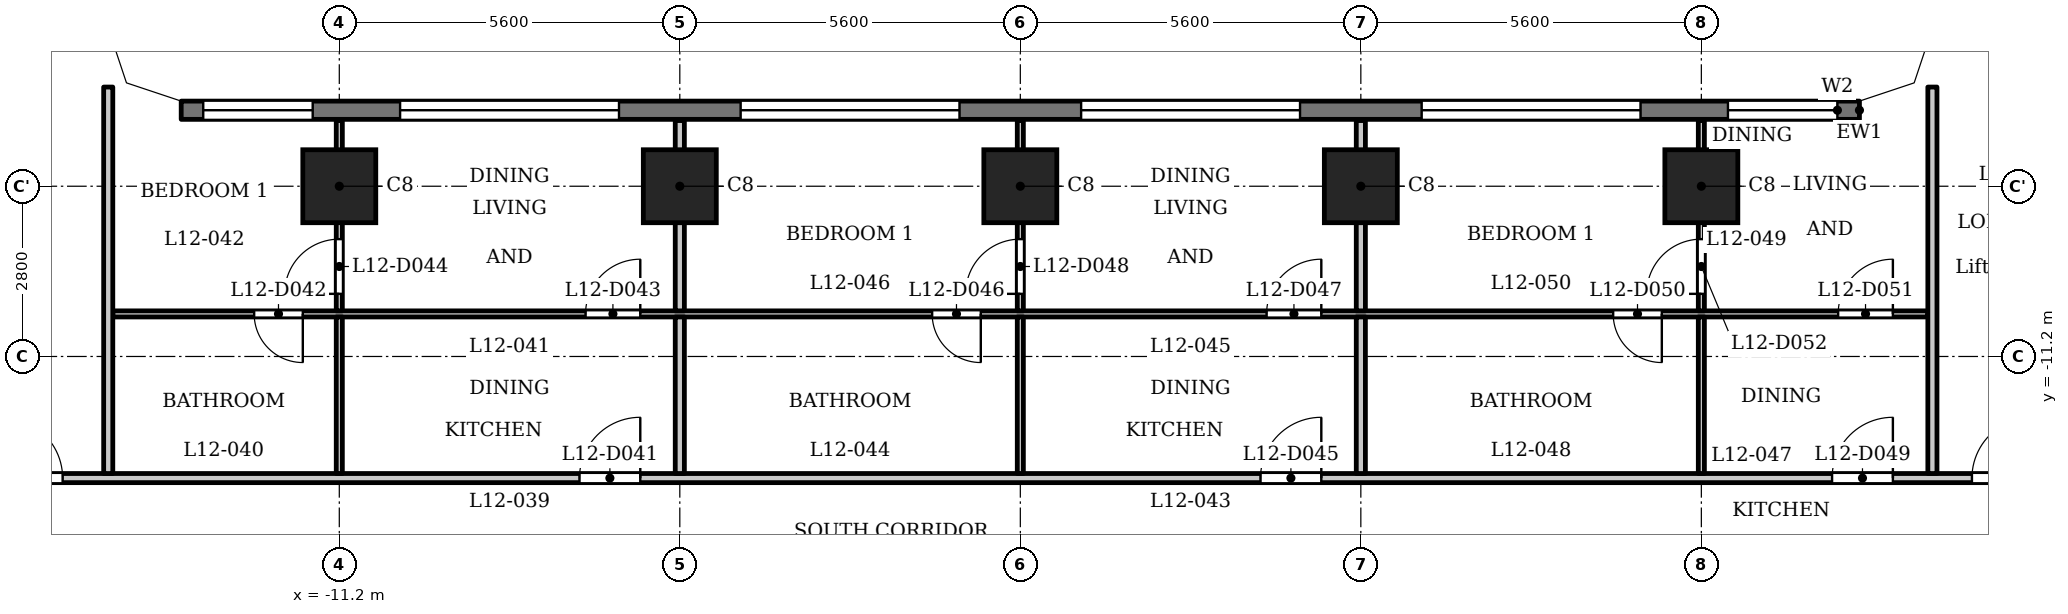
"""IFC4 building model, lengths in metres.
Left out: names, types, materials, properties, quantities, classifications, styles, units other than length and angle.
Written with IfcOpenShell. Run it as: python <this file> out.ifc"""

import sys

from ifc_helpers import new_model, si_unit, direction, frame, frame_2d, origin, origin_2d, place, context, subcontext, project, spatial, polyline, rectangle, outline, extrude, element, fill, save


model = new_model("IFC4")
c1 = context("Model", 3, precision=1e-05, world=origin(), true_north=direction((0.0, 1.0)))
c2 = subcontext(c1, "Body", "Model", "MODEL_VIEW")
j1 = project(units=[si_unit("LENGTHUNIT", "METRE"), si_unit("PLANEANGLEUNIT", "RADIAN")], contexts=[c1])
p1 = place(None, origin())
s1 = spatial("IfcSite", under=j1, at=p1, CompositionType="ELEMENT")
p2 = place(p1, origin())
s2 = spatial("IfcBuilding", under=s1, at=p2, CompositionType="ELEMENT")
p3 = place(p2, frame((0.0, 0.0, 51.5)))
s3 = spatial("IfcBuildingStorey", under=s2, at=p3, CompositionType="ELEMENT", Elevation=51.5)
for number, where, z_axis, x_axis in (
    (1, (-11.2, -8.4, 0.0), (0.0, 0.0, 1.0), (1.0, 0.0, 0.0)),
    (2, (-5.6, -8.4, 0.0), (0.0, 0.0, 1.0), (1.0, 0.0, 0.0)),
    (3, (0.0, -8.4, 0.0), (0.0, 0.0, 1.0), (1.0, 0.0, 0.0)),
    (4, (5.6, -8.4, 0.0), (0.0, 0.0, 1.0), (1.0, 0.0, 0.0)),
    (5, (11.2, -8.4, 0.0), (0.0, 0.0, 1.0), (1.0, 0.0, 0.0)),
):
    element("IfcColumn", number, at=place(p3, frame(where, z_axis=z_axis, x_axis=x_axis)), inside=s3, PredefinedType="COLUMN", context=c2, shape_type="SweptSolid", body=[
        extrude(rectangle(XDim=1.2, YDim=1.2, at=origin_2d()), origin(), (0.0, 0.0, 1.0), 3.5),
    ])
p4 = place(p3, frame((13.8, -7.15, 0.0), z_axis=(0.0, 0.0, 1.0), x_axis=(-1.0, 0.0, 0.0)))
e6 = element("IfcWall", 6, at=p4, inside=s3, PredefinedType="SOLIDWALL", context=c2, shape_type="SweptSolid", body=[
    extrude(rectangle(XDim=27.6, YDim=0.3, at=frame_2d((13.8, 0.0))), origin(), (0.0, 0.0, 1.0), 3.2),
])
p5 = place(p4, frame((0.363, 0.0, 0.9)))
e7 = element("IfcOpeningElement", 7, at=p5, cuts=e6, PredefinedType="OPENING", context=c2, shape_type="SweptSolid", body=[
    extrude(rectangle(XDim=1.8, YDim=1.25, at=frame_2d((0.9, 0.625))), frame((0.0, 0.16, 0.0), z_axis=(0.0, -1.0, 0.0), x_axis=(1.0, 0.0, 0.0)), (0.0, 0.0, 1.0), 0.32),
])
p6 = place(p4, frame((3.6, 0.0, 1.2)))
e8 = element("IfcOpeningElement", 8, at=p6, cuts=e6, PredefinedType="OPENING", context=c2, shape_type="SweptSolid", body=[
    extrude(rectangle(XDim=3.6, YDim=0.95, at=frame_2d((1.8, 0.475))), frame((0.0, 0.16, 0.0), z_axis=(0.0, -1.0, 0.0), x_axis=(1.0, 0.0, 0.0)), (0.0, 0.0, 1.0), 0.32),
])
p7 = place(p4, frame((9.2, 0.0, 1.2)))
e9 = element("IfcOpeningElement", 9, at=p7, cuts=e6, PredefinedType="OPENING", context=c2, shape_type="SweptSolid", body=[
    extrude(rectangle(XDim=3.6, YDim=0.95, at=frame_2d((1.8, 0.475))), frame((0.0, 0.16, 0.0), z_axis=(0.0, -1.0, 0.0), x_axis=(1.0, 0.0, 0.0)), (0.0, 0.0, 1.0), 0.32),
])
p8 = place(p4, frame((14.8, 0.0, 1.2)))
e10 = element("IfcOpeningElement", 10, at=p8, cuts=e6, PredefinedType="OPENING", context=c2, shape_type="SweptSolid", body=[
    extrude(rectangle(XDim=3.6, YDim=0.95, at=frame_2d((1.8, 0.475))), frame((0.0, 0.16, 0.0), z_axis=(0.0, -1.0, 0.0), x_axis=(1.0, 0.0, 0.0)), (0.0, 0.0, 1.0), 0.32),
])
p9 = place(p4, frame((20.4, 0.0, 1.2)))
e11 = element("IfcOpeningElement", 11, at=p9, cuts=e6, PredefinedType="OPENING", context=c2, shape_type="SweptSolid", body=[
    extrude(rectangle(XDim=3.6, YDim=0.95, at=frame_2d((1.8, 0.475))), frame((0.0, 0.16, 0.0), z_axis=(0.0, -1.0, 0.0), x_axis=(1.0, 0.0, 0.0)), (0.0, 0.0, 1.0), 0.32),
])
p10 = place(p4, frame((25.438, 0.0, 0.9)))
e12 = element("IfcOpeningElement", 12, at=p10, cuts=e6, PredefinedType="OPENING", context=c2, shape_type="SweptSolid", body=[
    extrude(rectangle(XDim=1.8, YDim=1.25, at=frame_2d((0.9, 0.625))), frame((0.0, 0.16, 0.0), z_axis=(0.0, -1.0, 0.0), x_axis=(1.0, 0.0, 0.0)), (0.0, 0.0, 1.0), 0.32),
])
p11 = place(p3, frame((-17.4, -13.2, 0.0), z_axis=(0.0, 0.0, 1.0), x_axis=(1.0, 0.0, 0.0)))
e13 = element("IfcWall", 13, at=p11, inside=s3, PredefinedType="PARTITIONING", context=c2, shape_type="SweptSolid", body=[
    extrude(rectangle(XDim=34.8, YDim=0.15, at=frame_2d((17.4, 0.0))), origin(), (0.0, 0.0, 1.0), 3.2),
])
p12 = place(p11, frame((0.65, 0.0, 0.0)))
e14 = element("IfcOpeningElement", 14, at=p12, cuts=e13, PredefinedType="OPENING", context=c2, shape_type="SweptSolid", body=[
    extrude(rectangle(XDim=1.0, YDim=2.1, at=frame_2d((0.5, 1.05))), frame((0.0, 0.085, 0.0), z_axis=(0.0, -1.0, 0.0), x_axis=(1.0, 0.0, 0.0)), (0.0, 0.0, 1.0), 0.17),
])
p13 = place(p11, frame((33.05, 0.0, 0.0)))
e15 = element("IfcOpeningElement", 15, at=p13, cuts=e13, PredefinedType="OPENING", context=c2, shape_type="SweptSolid", body=[
    extrude(rectangle(XDim=1.0, YDim=2.1, at=frame_2d((0.5, 1.05))), frame((0.0, 0.085, 0.0), z_axis=(0.0, -1.0, 0.0), x_axis=(1.0, 0.0, 0.0)), (0.0, 0.0, 1.0), 0.17),
])
p14 = place(p11, frame((10.15, 0.0, 0.0)))
e16 = element("IfcOpeningElement", 16, at=p14, cuts=e13, PredefinedType="OPENING", context=c2, shape_type="SweptSolid", body=[
    extrude(rectangle(XDim=1.0, YDim=2.1, at=frame_2d((0.5, 1.05))), frame((0.0, 0.085, 0.0), z_axis=(0.0, -1.0, 0.0), x_axis=(1.0, 0.0, 0.0)), (0.0, 0.0, 1.0), 0.17),
])
p15 = place(p11, frame((21.35, 0.0, 0.0)))
e17 = element("IfcOpeningElement", 17, at=p15, cuts=e13, PredefinedType="OPENING", context=c2, shape_type="SweptSolid", body=[
    extrude(rectangle(XDim=1.0, YDim=2.1, at=frame_2d((0.5, 1.05))), frame((0.0, 0.085, 0.0), z_axis=(0.0, -1.0, 0.0), x_axis=(1.0, 0.0, 0.0)), (0.0, 0.0, 1.0), 0.17),
])
p16 = place(p11, frame((30.75, 0.0, 0.0)))
e18 = element("IfcOpeningElement", 18, at=p16, cuts=e13, PredefinedType="OPENING", context=c2, shape_type="SweptSolid", body=[
    extrude(rectangle(XDim=1.0, YDim=2.1, at=frame_2d((0.5, 1.05))), frame((0.0, 0.085, 0.0), z_axis=(0.0, -1.0, 0.0), x_axis=(1.0, 0.0, 0.0)), (0.0, 0.0, 1.0), 0.17),
])
p17 = place(p3, frame((-14.925, -10.5, 0.0), z_axis=(0.0, 0.0, 1.0), x_axis=(1.0, 0.0, 0.0)))
e19 = element("IfcWall", 19, at=p17, inside=s3, PredefinedType="PARTITIONING", context=c2, shape_type="SweptSolid", body=[
    extrude(rectangle(XDim=29.85, YDim=0.1, at=frame_2d((14.925, 0.0))), origin(), (0.0, 0.0, 1.0), 3.2),
])
p18 = place(p17, frame((2.325, 0.0, 0.0)))
e20 = element("IfcOpeningElement", 20, at=p18, cuts=e19, PredefinedType="OPENING", context=c2, shape_type="SweptSolid", body=[
    extrude(rectangle(XDim=0.8, YDim=2.1, at=frame_2d((0.4, 1.05))), frame((0.0, 0.06, 0.0), z_axis=(0.0, -1.0, 0.0), x_axis=(1.0, 0.0, 0.0)), (0.0, 0.0, 1.0), 0.12),
])
p19 = place(p17, frame((7.775, 0.0, 0.0)))
e21 = element("IfcOpeningElement", 21, at=p19, cuts=e19, PredefinedType="OPENING", context=c2, shape_type="SweptSolid", body=[
    extrude(rectangle(XDim=0.9, YDim=2.1, at=frame_2d((0.45, 1.05))), frame((0.0, 0.06, 0.0), z_axis=(0.0, -1.0, 0.0), x_axis=(1.0, 0.0, 0.0)), (0.0, 0.0, 1.0), 0.12),
])
p20 = place(p17, frame((13.475, 0.0, 0.0)))
e22 = element("IfcOpeningElement", 22, at=p20, cuts=e19, PredefinedType="OPENING", context=c2, shape_type="SweptSolid", body=[
    extrude(rectangle(XDim=0.8, YDim=2.1, at=frame_2d((0.4, 1.05))), frame((0.0, 0.06, 0.0), z_axis=(0.0, -1.0, 0.0), x_axis=(1.0, 0.0, 0.0)), (0.0, 0.0, 1.0), 0.12),
])
p21 = place(p17, frame((18.975, 0.0, 0.0)))
e23 = element("IfcOpeningElement", 23, at=p21, cuts=e19, PredefinedType="OPENING", context=c2, shape_type="SweptSolid", body=[
    extrude(rectangle(XDim=0.9, YDim=2.1, at=frame_2d((0.45, 1.05))), frame((0.0, 0.06, 0.0), z_axis=(0.0, -1.0, 0.0), x_axis=(1.0, 0.0, 0.0)), (0.0, 0.0, 1.0), 0.12),
])
p22 = place(p17, frame((24.675, 0.0, 0.0)))
e24 = element("IfcOpeningElement", 24, at=p22, cuts=e19, PredefinedType="OPENING", context=c2, shape_type="SweptSolid", body=[
    extrude(rectangle(XDim=0.8, YDim=2.1, at=frame_2d((0.4, 1.05))), frame((0.0, 0.06, 0.0), z_axis=(0.0, -1.0, 0.0), x_axis=(1.0, 0.0, 0.0)), (0.0, 0.0, 1.0), 0.12),
])
p23 = place(p17, frame((28.375, 0.0, 0.0)))
e25 = element("IfcOpeningElement", 25, at=p23, cuts=e19, PredefinedType="OPENING", context=c2, shape_type="SweptSolid", body=[
    extrude(rectangle(XDim=0.9, YDim=2.1, at=frame_2d((0.45, 1.05))), frame((0.0, 0.06, 0.0), z_axis=(0.0, -1.0, 0.0), x_axis=(1.0, 0.0, 0.0)), (0.0, 0.0, 1.0), 0.12),
])
p24 = place(p3, frame((-15.0, -13.125, 0.0), z_axis=(0.0, 0.0, 1.0), x_axis=(0.0, 1.0, 0.0)))
e26 = element("IfcWall", 26, at=p24, inside=s3, PredefinedType="PARTITIONING", context=c2, shape_type="SweptSolid", body=[
    extrude(rectangle(XDim=6.356, YDim=0.15, at=frame_2d((3.178, 0.0))), origin(), (0.0, 0.0, 1.0), 3.2),
])
p25 = place(p3, frame((-11.2, -13.125, 0.0), z_axis=(0.0, 0.0, 1.0), x_axis=(0.0, 1.0, 0.0)))
e27 = element("IfcWall", 27, at=p25, inside=s3, PredefinedType="PARTITIONING", context=c2, shape_type="SweptSolid", body=[
    extrude(rectangle(XDim=2.575, YDim=0.1, at=frame_2d((1.288, 0.0))), origin(), (0.0, 0.0, 1.0), 3.2),
])
p26 = place(p3, frame((-11.2, -10.45, 0.0), z_axis=(0.0, 0.0, 1.0), x_axis=(0.0, 1.0, 0.0)))
e28 = element("IfcWall", 28, at=p26, inside=s3, PredefinedType="PARTITIONING", context=c2, shape_type="SweptSolid", body=[
    extrude(rectangle(XDim=3.13, YDim=0.1, at=frame_2d((1.565, 0.0))), origin(), (0.0, 0.0, 1.0), 3.2),
])
p27 = place(p26, frame((0.28, 0.0, 0.0)))
e29 = element("IfcOpeningElement", 29, at=p27, cuts=e28, PredefinedType="OPENING", context=c2, shape_type="SweptSolid", body=[
    extrude(rectangle(XDim=0.9, YDim=2.1, at=frame_2d((0.45, 1.05))), frame((0.0, 0.06, 0.0), z_axis=(0.0, -1.0, 0.0), x_axis=(1.0, 0.0, 0.0)), (0.0, 0.0, 1.0), 0.12),
])
p28 = place(p3, frame((-5.6, -13.125, 0.0), z_axis=(0.0, 0.0, 1.0), x_axis=(0.0, 1.0, 0.0)))
e30 = element("IfcWall", 30, at=p28, inside=s3, PredefinedType="PARTITIONING", context=c2, shape_type="SweptSolid", body=[
    extrude(rectangle(XDim=2.575, YDim=0.15, at=frame_2d((1.288, 0.0))), origin(), (0.0, 0.0, 1.0), 3.2),
])
p29 = place(p3, frame((-5.6, -10.45, 0.0), z_axis=(0.0, 0.0, 1.0), x_axis=(0.0, 1.0, 0.0)))
e31 = element("IfcWall", 31, at=p29, inside=s3, PredefinedType="PARTITIONING", context=c2, shape_type="SweptSolid", body=[
    extrude(rectangle(XDim=3.13, YDim=0.15, at=frame_2d((1.565, 0.0))), origin(), (0.0, 0.0, 1.0), 3.2),
])
p30 = place(p3, frame((0.0, -13.125, 0.0), z_axis=(0.0, 0.0, 1.0), x_axis=(0.0, 1.0, 0.0)))
e32 = element("IfcWall", 32, at=p30, inside=s3, PredefinedType="PARTITIONING", context=c2, shape_type="SweptSolid", body=[
    extrude(rectangle(XDim=2.575, YDim=0.1, at=frame_2d((1.288, 0.0))), origin(), (0.0, 0.0, 1.0), 3.2),
])
p31 = place(p3, frame((0.0, -10.45, 0.0), z_axis=(0.0, 0.0, 1.0), x_axis=(0.0, 1.0, 0.0)))
e33 = element("IfcWall", 33, at=p31, inside=s3, PredefinedType="PARTITIONING", context=c2, shape_type="SweptSolid", body=[
    extrude(rectangle(XDim=3.13, YDim=0.1, at=frame_2d((1.565, 0.0))), origin(), (0.0, 0.0, 1.0), 3.2),
])
p32 = place(p31, frame((0.28, 0.0, 0.0)))
e34 = element("IfcOpeningElement", 34, at=p32, cuts=e33, PredefinedType="OPENING", context=c2, shape_type="SweptSolid", body=[
    extrude(rectangle(XDim=0.9, YDim=2.1, at=frame_2d((0.45, 1.05))), frame((0.0, 0.06, 0.0), z_axis=(0.0, -1.0, 0.0), x_axis=(1.0, 0.0, 0.0)), (0.0, 0.0, 1.0), 0.12),
])
p33 = place(p3, frame((5.6, -13.125, 0.0), z_axis=(0.0, 0.0, 1.0), x_axis=(0.0, 1.0, 0.0)))
e35 = element("IfcWall", 35, at=p33, inside=s3, PredefinedType="PARTITIONING", context=c2, shape_type="SweptSolid", body=[
    extrude(rectangle(XDim=2.575, YDim=0.15, at=frame_2d((1.288, 0.0))), origin(), (0.0, 0.0, 1.0), 3.2),
])
p34 = place(p3, frame((5.6, -10.45, 0.0), z_axis=(0.0, 0.0, 1.0), x_axis=(0.0, 1.0, 0.0)))
e36 = element("IfcWall", 36, at=p34, inside=s3, PredefinedType="PARTITIONING", context=c2, shape_type="SweptSolid", body=[
    extrude(rectangle(XDim=3.13, YDim=0.15, at=frame_2d((1.565, 0.0))), origin(), (0.0, 0.0, 1.0), 3.2),
])
p35 = place(p3, frame((11.2, -13.125, 0.0), z_axis=(0.0, 0.0, 1.0), x_axis=(0.0, 1.0, 0.0)))
e37 = element("IfcWall", 37, at=p35, inside=s3, PredefinedType="PARTITIONING", context=c2, shape_type="SweptSolid", body=[
    extrude(rectangle(XDim=2.575, YDim=0.1, at=frame_2d((1.288, 0.0))), origin(), (0.0, 0.0, 1.0), 3.2),
])
p36 = place(p3, frame((11.2, -10.45, 0.0), z_axis=(0.0, 0.0, 1.0), x_axis=(0.0, 1.0, 0.0)))
e38 = element("IfcWall", 38, at=p36, inside=s3, PredefinedType="PARTITIONING", context=c2, shape_type="SweptSolid", body=[
    extrude(rectangle(XDim=3.13, YDim=0.1, at=frame_2d((1.565, 0.0))), origin(), (0.0, 0.0, 1.0), 3.2),
])
p37 = place(p36, frame((0.28, 0.0, 0.0)))
e39 = element("IfcOpeningElement", 39, at=p37, cuts=e38, PredefinedType="OPENING", context=c2, shape_type="SweptSolid", body=[
    extrude(rectangle(XDim=0.9, YDim=2.1, at=frame_2d((0.45, 1.05))), frame((0.0, 0.06, 0.0), z_axis=(0.0, -1.0, 0.0), x_axis=(1.0, 0.0, 0.0)), (0.0, 0.0, 1.0), 0.12),
])
p38 = place(p3, frame((15.0, -13.125, 0.0), z_axis=(0.0, 0.0, 1.0), x_axis=(0.0, 1.0, 0.0)))
e40 = element("IfcWall", 40, at=p38, inside=s3, PredefinedType="PARTITIONING", context=c2, shape_type="SweptSolid", body=[
    extrude(rectangle(XDim=6.356, YDim=0.15, at=frame_2d((3.178, 0.0))), origin(), (0.0, 0.0, 1.0), 3.2),
])
p39 = place(p3, origin())
e41 = element("IfcWall", 41, at=p39, inside=s3, PredefinedType="SOLIDWALL", context=c2, shape_type="SweptSolid", body=[
    extrude(outline(polyline([(14.937, -6.937), (15.3, -5.849), (15.3, -5.8), (15.0, -5.8), (14.7, -6.7), (13.8, -7.0), (13.8, -7.3), (13.849, -7.3), (14.937, -6.937)])), origin(), (0.0, 0.0, 1.0), 3.2),
])
e42 = element("IfcWall", 42, at=p39, inside=s3, PredefinedType="SOLIDWALL", context=c2, shape_type="SweptSolid", body=[
    extrude(outline(polyline([(-14.937, -6.937), (-13.849, -7.3), (-13.8, -7.3), (-13.8, -7.0), (-14.7, -6.7), (-15.0, -5.8), (-15.3, -5.8), (-15.3, -5.849), (-14.937, -6.937)])), origin(), (0.0, 0.0, 1.0), 3.2),
])
p40 = place(p12, origin())
e43 = element("IfcDoor", 43, at=p40, inside=s3, OperationType="SINGLE_SWING_RIGHT", PredefinedType="DOOR", context=c2, shape_type="SweptSolid", body=[
    extrude(rectangle(XDim=1.0, YDim=2.1, at=frame_2d((0.5, 1.05))), frame((0.0, 0.025, 0.0), z_axis=(0.0, -1.0, 0.0), x_axis=(1.0, 0.0, 0.0)), (0.0, 0.0, 1.0), 0.05),
])
fill(e14, e43)
p41 = place(p13, origin())
e44 = element("IfcDoor", 44, at=p41, inside=s3, OperationType="SINGLE_SWING_LEFT", PredefinedType="DOOR", context=c2, shape_type="SweptSolid", body=[
    extrude(rectangle(XDim=1.0, YDim=2.1, at=frame_2d((0.5, 1.05))), frame((0.0, 0.025, 0.0), z_axis=(0.0, -1.0, 0.0), x_axis=(1.0, 0.0, 0.0)), (0.0, 0.0, 1.0), 0.05),
])
fill(e15, e44)
p42 = place(p14, origin())
e45 = element("IfcDoor", 45, at=p42, inside=s3, OperationType="SINGLE_SWING_LEFT", PredefinedType="DOOR", context=c2, shape_type="SweptSolid", body=[
    extrude(rectangle(XDim=1.0, YDim=2.1, at=frame_2d((0.5, 1.05))), frame((0.0, 0.025, 0.0), z_axis=(0.0, -1.0, 0.0), x_axis=(1.0, 0.0, 0.0)), (0.0, 0.0, 1.0), 0.05),
])
fill(e16, e45)
p43 = place(p18, origin())
e46 = element("IfcDoor", 46, at=p43, inside=s3, OperationType="SINGLE_SWING_RIGHT", PredefinedType="DOOR", context=c2, shape_type="SweptSolid", body=[
    extrude(rectangle(XDim=0.8, YDim=2.1, at=frame_2d((0.4, 1.05))), frame((0.0, 0.025, 0.0), z_axis=(0.0, -1.0, 0.0), x_axis=(1.0, 0.0, 0.0)), (0.0, 0.0, 1.0), 0.05),
])
fill(e20, e46)
p44 = place(p19, origin())
e47 = element("IfcDoor", 47, at=p44, inside=s3, OperationType="SINGLE_SWING_LEFT", PredefinedType="DOOR", context=c2, shape_type="SweptSolid", body=[
    extrude(rectangle(XDim=0.9, YDim=2.1, at=frame_2d((0.45, 1.05))), frame((0.0, 0.025, 0.0), z_axis=(0.0, -1.0, 0.0), x_axis=(1.0, 0.0, 0.0)), (0.0, 0.0, 1.0), 0.05),
])
fill(e21, e47)
p45 = place(p27, origin())
e48 = element("IfcDoor", 48, at=p45, inside=s3, OperationType="SINGLE_SWING_RIGHT", PredefinedType="DOOR", context=c2, shape_type="SweptSolid", body=[
    extrude(rectangle(XDim=0.9, YDim=2.1, at=frame_2d((0.45, 1.05))), frame((0.0, 0.025, 0.0), z_axis=(0.0, -1.0, 0.0), x_axis=(1.0, 0.0, 0.0)), (0.0, 0.0, 1.0), 0.05),
])
fill(e29, e48)
p46 = place(p15, origin())
e49 = element("IfcDoor", 49, at=p46, inside=s3, OperationType="SINGLE_SWING_LEFT", PredefinedType="DOOR", context=c2, shape_type="SweptSolid", body=[
    extrude(rectangle(XDim=1.0, YDim=2.1, at=frame_2d((0.5, 1.05))), frame((0.0, 0.025, 0.0), z_axis=(0.0, -1.0, 0.0), x_axis=(1.0, 0.0, 0.0)), (0.0, 0.0, 1.0), 0.05),
])
fill(e17, e49)
p47 = place(p20, origin())
e50 = element("IfcDoor", 50, at=p47, inside=s3, OperationType="SINGLE_SWING_RIGHT", PredefinedType="DOOR", context=c2, shape_type="SweptSolid", body=[
    extrude(rectangle(XDim=0.8, YDim=2.1, at=frame_2d((0.4, 1.05))), frame((0.0, 0.025, 0.0), z_axis=(0.0, -1.0, 0.0), x_axis=(1.0, 0.0, 0.0)), (0.0, 0.0, 1.0), 0.05),
])
fill(e22, e50)
p48 = place(p21, origin())
e51 = element("IfcDoor", 51, at=p48, inside=s3, OperationType="SINGLE_SWING_LEFT", PredefinedType="DOOR", context=c2, shape_type="SweptSolid", body=[
    extrude(rectangle(XDim=0.9, YDim=2.1, at=frame_2d((0.45, 1.05))), frame((0.0, 0.025, 0.0), z_axis=(0.0, -1.0, 0.0), x_axis=(1.0, 0.0, 0.0)), (0.0, 0.0, 1.0), 0.05),
])
fill(e23, e51)
p49 = place(p32, origin())
e52 = element("IfcDoor", 52, at=p49, inside=s3, OperationType="SINGLE_SWING_RIGHT", PredefinedType="DOOR", context=c2, shape_type="SweptSolid", body=[
    extrude(rectangle(XDim=0.9, YDim=2.1, at=frame_2d((0.45, 1.05))), frame((0.0, 0.025, 0.0), z_axis=(0.0, -1.0, 0.0), x_axis=(1.0, 0.0, 0.0)), (0.0, 0.0, 1.0), 0.05),
])
fill(e34, e52)
p50 = place(p16, origin())
e53 = element("IfcDoor", 53, at=p50, inside=s3, OperationType="SINGLE_SWING_LEFT", PredefinedType="DOOR", context=c2, shape_type="SweptSolid", body=[
    extrude(rectangle(XDim=1.0, YDim=2.1, at=frame_2d((0.5, 1.05))), frame((0.0, 0.025, 0.0), z_axis=(0.0, -1.0, 0.0), x_axis=(1.0, 0.0, 0.0)), (0.0, 0.0, 1.0), 0.05),
])
fill(e18, e53)
p51 = place(p22, origin())
e54 = element("IfcDoor", 54, at=p51, inside=s3, OperationType="SINGLE_SWING_RIGHT", PredefinedType="DOOR", context=c2, shape_type="SweptSolid", body=[
    extrude(rectangle(XDim=0.8, YDim=2.1, at=frame_2d((0.4, 1.05))), frame((0.0, 0.025, 0.0), z_axis=(0.0, -1.0, 0.0), x_axis=(1.0, 0.0, 0.0)), (0.0, 0.0, 1.0), 0.05),
])
fill(e24, e54)
p52 = place(p23, origin())
e55 = element("IfcDoor", 55, at=p52, inside=s3, OperationType="SINGLE_SWING_LEFT", PredefinedType="DOOR", context=c2, shape_type="SweptSolid", body=[
    extrude(rectangle(XDim=0.9, YDim=2.1, at=frame_2d((0.45, 1.05))), frame((0.0, 0.025, 0.0), z_axis=(0.0, -1.0, 0.0), x_axis=(1.0, 0.0, 0.0)), (0.0, 0.0, 1.0), 0.05),
])
fill(e25, e55)
p53 = place(p37, origin())
e56 = element("IfcDoor", 56, at=p53, inside=s3, OperationType="SINGLE_SWING_RIGHT", PredefinedType="DOOR", context=c2, shape_type="SweptSolid", body=[
    extrude(rectangle(XDim=0.9, YDim=2.1, at=frame_2d((0.45, 1.05))), frame((0.0, 0.025, 0.0), z_axis=(0.0, -1.0, 0.0), x_axis=(1.0, 0.0, 0.0)), (0.0, 0.0, 1.0), 0.05),
])
fill(e39, e56)
p54 = place(p5, origin())
e57 = element("IfcWindow", 57, at=p54, inside=s3, PartitioningType="SINGLE_PANEL", PredefinedType="WINDOW", context=c2, shape_type="SweptSolid", body=[
    extrude(rectangle(XDim=1.8, YDim=1.25, at=frame_2d((0.9, 0.625))), frame((0.0, 0.03, 0.0), z_axis=(0.0, -1.0, 0.0), x_axis=(1.0, 0.0, 0.0)), (0.0, 0.0, 1.0), 0.06),
])
fill(e7, e57)
p55 = place(p6, origin())
e58 = element("IfcWindow", 58, at=p55, inside=s3, PartitioningType="SINGLE_PANEL", PredefinedType="WINDOW", context=c2, shape_type="SweptSolid", body=[
    extrude(rectangle(XDim=3.6, YDim=0.95, at=frame_2d((1.8, 0.475))), frame((0.0, 0.03, 0.0), z_axis=(0.0, -1.0, 0.0), x_axis=(1.0, 0.0, 0.0)), (0.0, 0.0, 1.0), 0.06),
])
fill(e8, e58)
p56 = place(p7, origin())
e59 = element("IfcWindow", 59, at=p56, inside=s3, PartitioningType="SINGLE_PANEL", PredefinedType="WINDOW", context=c2, shape_type="SweptSolid", body=[
    extrude(rectangle(XDim=3.6, YDim=0.95, at=frame_2d((1.8, 0.475))), frame((0.0, 0.03, 0.0), z_axis=(0.0, -1.0, 0.0), x_axis=(1.0, 0.0, 0.0)), (0.0, 0.0, 1.0), 0.06),
])
fill(e9, e59)
p57 = place(p8, origin())
e60 = element("IfcWindow", 60, at=p57, inside=s3, PartitioningType="SINGLE_PANEL", PredefinedType="WINDOW", context=c2, shape_type="SweptSolid", body=[
    extrude(rectangle(XDim=3.6, YDim=0.95, at=frame_2d((1.8, 0.475))), frame((0.0, 0.03, 0.0), z_axis=(0.0, -1.0, 0.0), x_axis=(1.0, 0.0, 0.0)), (0.0, 0.0, 1.0), 0.06),
])
fill(e10, e60)
p58 = place(p9, origin())
e61 = element("IfcWindow", 61, at=p58, inside=s3, PartitioningType="SINGLE_PANEL", PredefinedType="WINDOW", context=c2, shape_type="SweptSolid", body=[
    extrude(rectangle(XDim=3.6, YDim=0.95, at=frame_2d((1.8, 0.475))), frame((0.0, 0.03, 0.0), z_axis=(0.0, -1.0, 0.0), x_axis=(1.0, 0.0, 0.0)), (0.0, 0.0, 1.0), 0.06),
])
fill(e11, e61)
p59 = place(p10, origin())
e62 = element("IfcWindow", 62, at=p59, inside=s3, PartitioningType="SINGLE_PANEL", PredefinedType="WINDOW", context=c2, shape_type="SweptSolid", body=[
    extrude(rectangle(XDim=1.8, YDim=1.25, at=frame_2d((0.9, 0.625))), frame((0.0, 0.03, 0.0), z_axis=(0.0, -1.0, 0.0), x_axis=(1.0, 0.0, 0.0)), (0.0, 0.0, 1.0), 0.06),
])
fill(e12, e62)
save(model, sys.argv[1])
